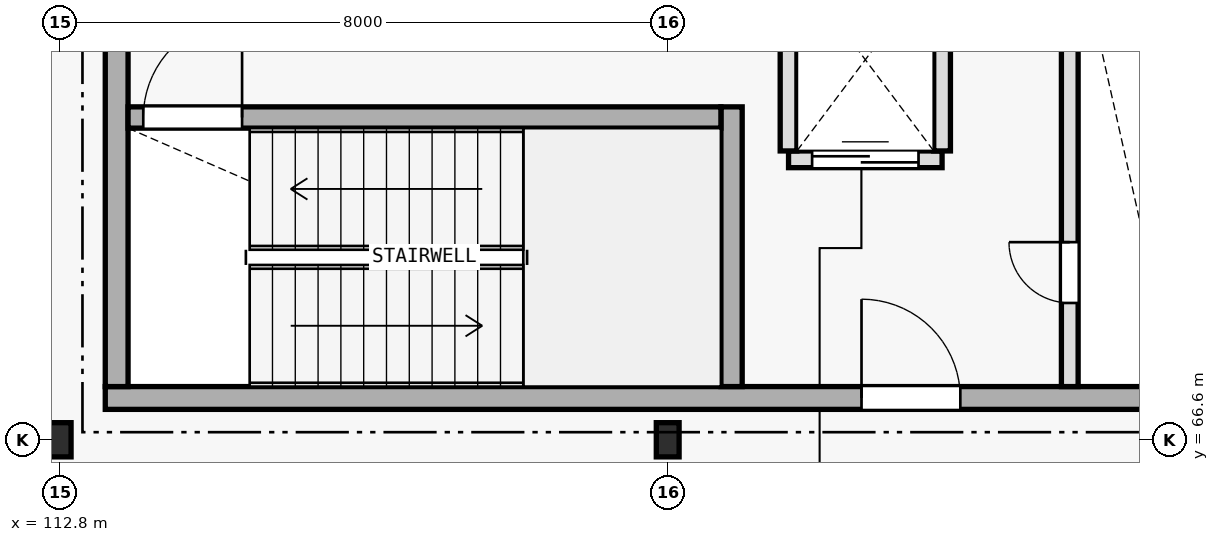
"""IFC4 building model, lengths in metres.
Left out: names, types, materials, properties, quantities, classifications, styles, units other than length and angle.
Written with IfcOpenShell. Run it as: python <this file> out.ifc"""

import sys

from ifc_helpers import new_model, si_unit, direction, frame, frame_2d, origin, origin_2d, place, context, subcontext, project, spatial, rectangle, i_section, extrude, element, fill, save


model = new_model("IFC4")
c1 = context("Model", 3, precision=1e-05, world=origin(), true_north=direction((0.0, 1.0)))
c2 = subcontext(c1, "Body", "Model", "MODEL_VIEW")
j1 = project(units=[si_unit("LENGTHUNIT", "METRE"), si_unit("PLANEANGLEUNIT", "RADIAN")], contexts=[c1])
p1 = place(None, origin())
s1 = spatial("IfcSite", under=j1, at=p1, CompositionType="ELEMENT")
p2 = place(p1, origin())
s2 = spatial("IfcBuilding", under=s1, at=p2, CompositionType="ELEMENT")
p3 = place(p2, frame((0.0, 0.0, 5.4)))
s3 = spatial("IfcBuildingStorey", under=s2, at=p3, CompositionType="ELEMENT", Elevation=5.4)
p4 = place(p3, frame((113.4, 67.15, 0.0), z_axis=(0.0, 0.0, 1.0), x_axis=(1.0, 0.0, 0.0)))
e1 = element("IfcWall", 1, at=p4, inside=s3, PredefinedType="SHEAR", context=c2, shape_type="SweptSolid", body=[
    extrude(rectangle(XDim=14.4, YDim=0.3, at=frame_2d((7.2, 0.0))), origin(), (0.0, 0.0, 1.0), 4.495),
])
p5 = place(p4, frame((9.95, 0.0, 0.0)))
e2 = element("IfcOpeningElement", 2, at=p5, cuts=e1, PredefinedType="OPENING", context=c2, shape_type="SweptSolid", body=[
    extrude(rectangle(XDim=1.3, YDim=2.2, at=frame_2d((0.65, 1.1))), frame((0.0, 0.16, 0.0), z_axis=(0.0, -1.0, 0.0), x_axis=(1.0, 0.0, 0.0)), (0.0, 0.0, 1.0), 0.32),
])
p6 = place(p3, frame((113.55, 67.3, 0.0), z_axis=(0.0, 0.0, 1.0), x_axis=(0.0, 1.0, 0.0)))
e3 = element("IfcWall", 3, at=p6, inside=s3, PredefinedType="SHEAR", context=c2, shape_type="SweptSolid", body=[
    extrude(rectangle(XDim=5.8, YDim=0.3, at=frame_2d((2.9, 0.0))), origin(), (0.0, 0.0, 1.0), 4.495),
])
p7 = place(p3, frame((121.64, 67.3, 0.0), z_axis=(0.0, 0.0, 1.0), x_axis=(0.0, 1.0, 0.0)))
e4 = element("IfcWall", 4, at=p7, inside=s3, PredefinedType="SHEAR", context=c2, shape_type="SweptSolid", body=[
    extrude(rectangle(XDim=3.68, YDim=0.28, at=frame_2d((1.84, 0.0))), origin(), (0.0, 0.0, 1.0), 4.495),
])
p8 = place(p3, frame((113.7, 70.84, 0.0), z_axis=(0.0, 0.0, 1.0), x_axis=(1.0, 0.0, 0.0)))
e5 = element("IfcWall", 5, at=p8, inside=s3, PredefinedType="SHEAR", context=c2, shape_type="SweptSolid", body=[
    extrude(rectangle(XDim=7.8, YDim=0.28, at=frame_2d((3.9, 0.0))), origin(), (0.0, 0.0, 1.0), 4.495),
])
p9 = place(p8, frame((0.2, 0.0, 0.0)))
e6 = element("IfcOpeningElement", 6, at=p9, cuts=e5, PredefinedType="OPENING", context=c2, shape_type="SweptSolid", body=[
    extrude(rectangle(XDim=1.3, YDim=2.2, at=frame_2d((0.65, 1.1))), frame((0.0, 0.15, 0.0), z_axis=(0.0, -1.0, 0.0), x_axis=(1.0, 0.0, 0.0)), (0.0, 0.0, 1.0), 0.3),
])
for number, where, z_axis, x_axis in (
    (7, (112.8, 66.6, 0.0), (0.0, 0.0, 1.0), (1.0, 0.0, 0.0)),
    (8, (120.8, 66.6, 0.0), (0.0, 0.0, 1.0), (1.0, 0.0, 0.0)),
):
    element("IfcColumn", number, at=place(p3, frame(where, z_axis=z_axis, x_axis=x_axis)), inside=s3, PredefinedType="COLUMN", context=c2, shape_type="SweptSolid", body=[
        extrude(i_section(OverallWidth=0.3, OverallDepth=0.45, WebThickness=0.014, FlangeThickness=0.026, FilletRadius=0.027, at=origin_2d()), origin(), (0.0, 0.0, 1.0), 4.5),
    ])
p10 = place(p3, frame((122.39, 70.29, 0.0), z_axis=(0.0, 0.0, 1.0), x_axis=(1.0, 0.0, 0.0)))
e9 = element("IfcWall", 9, at=p10, inside=s3, PredefinedType="PLUMBINGWALL", context=c2, shape_type="SweptSolid", body=[
    extrude(rectangle(XDim=2.02, YDim=0.22, at=frame_2d((1.01, 0.0))), origin(), (0.0, 0.0, 1.0), 4.2),
])
p11 = place(p10, frame((0.31, 0.0, 0.0)))
e10 = element("IfcOpeningElement", 10, at=p11, cuts=e9, PredefinedType="OPENING", context=c2, shape_type="SweptSolid", body=[
    extrude(rectangle(XDim=1.4, YDim=2.4, at=frame_2d((0.7, 1.2))), frame((0.0, 0.12, 0.0), z_axis=(0.0, -1.0, 0.0), x_axis=(1.0, 0.0, 0.0)), (0.0, 0.0, 1.0), 0.24),
])
for number, where, z_axis, x_axis in (
    (11, (122.39, 70.4, 0.0), (0.0, 0.0, 1.0), (0.0, 1.0, 0.0)),
    (12, (124.41, 70.4, 0.0), (0.0, 0.0, 1.0), (0.0, 1.0, 0.0)),
):
    element("IfcWall", number, at=place(p3, frame(where, z_axis=z_axis, x_axis=x_axis)), inside=s3, PredefinedType="PLUMBINGWALL", context=c2, shape_type="SweptSolid", body=[
        extrude(rectangle(XDim=2.4, YDim=0.22, at=frame_2d((1.2, 0.0))), origin(), (0.0, 0.0, 1.0), 4.2),
    ])
p12 = place(p3, frame((126.09, 67.3, 0.0), z_axis=(0.0, 0.0, 1.0), x_axis=(0.0, 1.0, 0.0)))
e13 = element("IfcWall", 13, at=p12, inside=s3, PredefinedType="PLUMBINGWALL", context=c2, shape_type="SweptSolid", body=[
    extrude(rectangle(XDim=5.8, YDim=0.22, at=frame_2d((2.9, 0.0))), origin(), (0.0, 0.0, 1.0), 4.2),
])
p13 = place(p12, frame((1.1, 0.0, 0.0)))
e14 = element("IfcOpeningElement", 14, at=p13, cuts=e13, PredefinedType="OPENING", context=c2, shape_type="SweptSolid", body=[
    extrude(rectangle(XDim=0.8, YDim=2.1, at=frame_2d((0.4, 1.05))), frame((0.0, 0.12, 0.0), z_axis=(0.0, -1.0, 0.0), x_axis=(1.0, 0.0, 0.0)), (0.0, 0.0, 1.0), 0.24),
])
p14 = place(p9, origin())
e15 = element("IfcDoor", 15, at=p14, inside=s3, OperationType="SINGLE_SWING_RIGHT", PredefinedType="DOOR", context=c2, shape_type="SweptSolid", body=[
    extrude(rectangle(XDim=1.3, YDim=2.2, at=frame_2d((0.65, 1.1))), frame((0.0, 0.025, 0.0), z_axis=(0.0, -1.0, 0.0), x_axis=(1.0, 0.0, 0.0)), (0.0, 0.0, 1.0), 0.05),
])
fill(e6, e15)
p15 = place(p11, origin())
e16 = element("IfcDoor", 16, at=p15, inside=s3, OperationType="DOUBLE_DOOR_SLIDING", PredefinedType="DOOR", context=c2, shape_type="SweptSolid", body=[
    extrude(rectangle(XDim=1.4, YDim=2.4, at=frame_2d((0.7, 1.2))), frame((0.0, 0.025, 0.0), z_axis=(0.0, -1.0, 0.0), x_axis=(1.0, 0.0, 0.0)), (0.0, 0.0, 1.0), 0.05),
])
fill(e10, e16)
p16 = place(p13, origin())
e17 = element("IfcDoor", 17, at=p16, inside=s3, OperationType="SINGLE_SWING_RIGHT", PredefinedType="DOOR", context=c2, shape_type="SweptSolid", body=[
    extrude(rectangle(XDim=0.8, YDim=2.1, at=frame_2d((0.4, 1.05))), frame((0.0, 0.025, 0.0), z_axis=(0.0, -1.0, 0.0), x_axis=(1.0, 0.0, 0.0)), (0.0, 0.0, 1.0), 0.05),
])
fill(e14, e17)
p17 = place(p5, origin())
e18 = element("IfcDoor", 18, at=p17, inside=s3, OperationType="SINGLE_SWING_LEFT", PredefinedType="DOOR", context=c2, shape_type="SweptSolid", body=[
    extrude(rectangle(XDim=1.3, YDim=2.2, at=frame_2d((0.65, 1.1))), frame((0.0, 0.025, 0.0), z_axis=(0.0, -1.0, 0.0), x_axis=(1.0, 0.0, 0.0)), (0.0, 0.0, 1.0), 0.05),
])
fill(e2, e18)
save(model, sys.argv[1])
